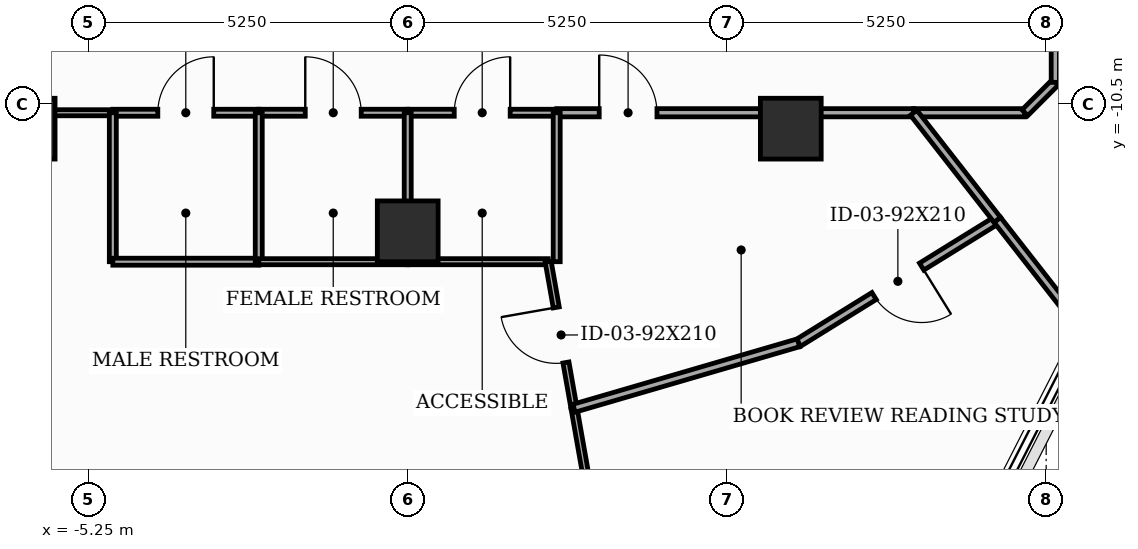
"""IFC4 building model, lengths in metres.
Left out: names, types, materials, properties, quantities, classifications, styles, units other than length and angle.
Written with IfcOpenShell. Run it as: python <this file> out.ifc"""

import sys

from ifc_helpers import new_model, si_unit, direction, frame, frame_2d, origin, origin_2d, place, context, subcontext, project, spatial, rectangle, extrude, element, fill, save


model = new_model("IFC4")
c1 = context("Model", 3, precision=1e-05, world=origin(), true_north=direction((0.0, 1.0)))
c2 = subcontext(c1, "Body", "Model", "MODEL_VIEW")
j1 = project(units=[si_unit("LENGTHUNIT", "METRE"), si_unit("PLANEANGLEUNIT", "RADIAN")], contexts=[c1])
p1 = place(None, origin())
s1 = spatial("IfcSite", under=j1, at=p1, CompositionType="ELEMENT")
p2 = place(p1, origin())
s2 = spatial("IfcBuilding", under=s1, at=p2, CompositionType="ELEMENT")
p3 = place(p2, frame((0.0, 0.0, 255.9)))
s3 = spatial("IfcBuildingStorey", under=s2, at=p3, CompositionType="ELEMENT", Elevation=255.9)
for number, where, z_axis, x_axis in (
    (1, (-6.3, -10.912, 0.0), (0.0, 0.0, 1.0), (1.0, 0.0, 0.0)),
    (2, (0.0, -12.6, 0.0), (0.0, 0.0, 1.0), (1.0, 0.0, 0.0)),
    (3, (6.3, -10.912, 0.0), (0.0, 0.0, 1.0), (1.0, 0.0, 0.0)),
):
    element("IfcColumn", number, at=place(p3, frame(where, z_axis=z_axis, x_axis=x_axis)), inside=s3, PredefinedType="COLUMN", context=c2, shape_type="SweptSolid", body=[
        extrude(rectangle(XDim=1.0, YDim=1.0, at=origin_2d()), origin(), (0.0, 0.0, 1.0), 3.7),
    ])
p4 = place(p3, frame((-4.85, -10.65, 0.0), z_axis=(0.0, 0.0, 1.0), x_axis=(1.0, 0.0, 0.0)))
e4 = element("IfcWall", 4, at=p4, inside=s3, PredefinedType="PARTITIONING", context=c2, shape_type="SweptSolid", body=[
    extrude(rectangle(XDim=2.4, YDim=0.115, at=frame_2d((1.2, 0.0))), origin(), (0.0, 0.0, 1.0), 3.5),
])
p5 = place(p4, frame((0.74, 0.0, 0.0)))
e5 = element("IfcOpeningElement", 5, at=p5, cuts=e4, PredefinedType="OPENING", context=c2, shape_type="SweptSolid", body=[
    extrude(rectangle(XDim=0.92, YDim=2.1, at=frame_2d((0.46, 1.05))), frame((0.0, 0.067, 0.0), z_axis=(0.0, -1.0, 0.0), x_axis=(1.0, 0.0, 0.0)), (0.0, 0.0, 1.0), 0.135),
])
p6 = place(p3, frame((-9.589, -10.65, 0.0), z_axis=(0.0, 0.0, 1.0), x_axis=(1.0, 0.0, 0.0)))
e6 = element("IfcWall", 6, at=p6, inside=s3, PredefinedType="MOVABLE", context=c2, shape_type="SweptSolid", body=[
    extrude(rectangle(XDim=4.739, YDim=0.1, at=frame_2d((2.37, 0.0))), origin(), (0.0, 0.0, 1.0), 2.885),
])
p7 = place(p3, frame((-2.45, -10.65, 0.0), z_axis=(0.0, 0.0, 1.0), x_axis=(1.0, 0.0, 0.0)))
e7 = element("IfcWall", 7, at=p7, inside=s3, PredefinedType="PARTITIONING", context=c2, shape_type="SweptSolid", body=[
    extrude(rectangle(XDim=2.45, YDim=0.115, at=frame_2d((1.225, 0.0))), origin(), (0.0, 0.0, 1.0), 2.885),
])
p8 = place(p7, frame((0.765, 0.0, 0.0)))
e8 = element("IfcOpeningElement", 8, at=p8, cuts=e7, PredefinedType="OPENING", context=c2, shape_type="SweptSolid", body=[
    extrude(rectangle(XDim=0.92, YDim=2.1, at=frame_2d((0.46, 1.05))), frame((0.0, 0.067, 0.0), z_axis=(0.0, -1.0, 0.0), x_axis=(1.0, 0.0, 0.0)), (0.0, 0.0, 1.0), 0.135),
])
p9 = place(p3, frame((0.0, -10.65, 0.0), z_axis=(0.0, 0.0, 1.0), x_axis=(1.0, 0.0, 0.0)))
e9 = element("IfcWall", 9, at=p9, inside=s3, PredefinedType="PARTITIONING", context=c2, shape_type="SweptSolid", body=[
    extrude(rectangle(XDim=2.45, YDim=0.115, at=frame_2d((1.225, 0.0))), origin(), (0.0, 0.0, 1.0), 3.5),
])
p10 = place(p9, frame((0.765, 0.0, 0.0)))
e10 = element("IfcOpeningElement", 10, at=p10, cuts=e9, PredefinedType="OPENING", context=c2, shape_type="SweptSolid", body=[
    extrude(rectangle(XDim=0.92, YDim=2.1, at=frame_2d((0.46, 1.05))), frame((0.0, 0.067, 0.0), z_axis=(0.0, -1.0, 0.0), x_axis=(1.0, 0.0, 0.0)), (0.0, 0.0, 1.0), 0.135),
])
p11 = place(p3, frame((2.45, -10.65, 0.0), z_axis=(0.0, 0.0, 1.0), x_axis=(1.0, 0.0, 0.0)))
e11 = element("IfcWall", 11, at=p11, inside=s3, PredefinedType="PARTITIONING", context=c2, shape_type="SweptSolid", body=[
    extrude(rectangle(XDim=5.871, YDim=0.135, at=frame_2d((2.936, 0.0))), origin(), (0.0, 0.0, 1.0), 2.885),
])
p12 = place(p11, frame((0.699, 0.0, 0.0)))
e12 = element("IfcOpeningElement", 12, at=p12, cuts=e11, PredefinedType="OPENING", context=c2, shape_type="SweptSolid", body=[
    extrude(rectangle(XDim=0.95, YDim=2.1, at=frame_2d((0.475, 1.05))), frame((0.0, 0.077, 0.0), z_axis=(0.0, -1.0, 0.0), x_axis=(1.0, 0.0, 0.0)), (0.0, 0.0, 1.0), 0.155),
])
p13 = place(p3, frame((8.321, -10.65, 0.0), z_axis=(0.0, 0.0, 1.0), x_axis=(1.0, 0.0, 0.0)))
e13 = element("IfcWall", 13, at=p13, inside=s3, PredefinedType="PARTITIONING", context=c2, shape_type="SweptSolid", body=[
    extrude(rectangle(XDim=1.829, YDim=0.135, at=frame_2d((0.915, 0.0))), origin(), (0.0, 0.0, 1.0), 3.5),
])
p14 = place(p3, frame((10.15, -10.65, 0.0), z_axis=(0.0, 0.0, 1.0), x_axis=(0.707106781187, 0.707106781187, 0.0)))
e14 = element("IfcWall", 14, at=p14, inside=s3, PredefinedType="PARTITIONING", context=c2, shape_type="SweptSolid", body=[
    extrude(rectangle(XDim=0.707, YDim=0.135, at=frame_2d((0.354, 0.0))), origin(), (0.0, 0.0, 1.0), 3.5),
])
p15 = place(p3, frame((10.65, -10.15, 0.0), z_axis=(0.0, 0.0, 1.0), x_axis=(0.0, 1.0, 0.0)))
e15 = element("IfcWall", 15, at=p15, inside=s3, PredefinedType="PARTITIONING", context=c2, shape_type="SweptSolid", body=[
    extrude(rectangle(XDim=5.408, YDim=0.135, at=frame_2d((2.704, 0.0))), origin(), (0.0, 0.0, 1.0), 2.885),
])
p16 = place(p3, frame((-4.85, -10.65, 0.0), z_axis=(0.0, 0.0, 1.0), x_axis=(0.0, -1.0, 0.0)))
e16 = element("IfcWall", 16, at=p16, inside=s3, PredefinedType="PARTITIONING", context=c2, shape_type="SweptSolid", body=[
    extrude(rectangle(XDim=2.45, YDim=0.115, at=frame_2d((1.225, 0.0))), origin(), (0.0, 0.0, 1.0), 2.885),
])
p17 = place(p3, frame((-4.85, -13.1, 0.0), z_axis=(0.0, 0.0, 1.0), x_axis=(1.0, 0.0, 0.0)))
e17 = element("IfcWall", 17, at=p17, inside=s3, PredefinedType="PARTITIONING", context=c2, shape_type="SweptSolid", body=[
    extrude(rectangle(XDim=2.4, YDim=0.115, at=frame_2d((1.2, 0.0))), origin(), (0.0, 0.0, 1.0), 3.5),
])
p18 = place(p3, frame((-2.45, -13.1, 0.0), z_axis=(0.0, 0.0, 1.0), x_axis=(0.0, 1.0, 0.0)))
e18 = element("IfcWall", 18, at=p18, inside=s3, PredefinedType="PARTITIONING", context=c2, shape_type="SweptSolid", body=[
    extrude(rectangle(XDim=2.45, YDim=0.115, at=frame_2d((1.225, 0.0))), origin(), (0.0, 0.0, 1.0), 2.885),
])
p19 = place(p3, frame((0.0, -13.1, 0.0), z_axis=(0.0, 0.0, 1.0), x_axis=(-1.0, 0.0, 0.0)))
e19 = element("IfcWall", 19, at=p19, inside=s3, PredefinedType="MOVABLE", context=c2, shape_type="SweptSolid", body=[
    extrude(rectangle(XDim=2.45, YDim=0.1, at=frame_2d((1.225, 0.0))), origin(), (0.0, 0.0, 1.0), 3.5),
])
p20 = place(p3, frame((2.31, -13.1, 0.0), z_axis=(0.0, 0.0, 1.0), x_axis=(-1.0, 0.0, 0.0)))
e20 = element("IfcWall", 20, at=p20, inside=s3, PredefinedType="MOVABLE", context=c2, shape_type="SweptSolid", body=[
    extrude(rectangle(XDim=2.31, YDim=0.1, at=frame_2d((1.155, 0.0))), origin(), (0.0, 0.0, 1.0), 3.5),
])
p21 = place(p3, frame((4.719, -26.759, 0.0), z_axis=(0.0, 0.0, 1.0), x_axis=(-0.173635361328, 0.984810012793, 0.0)))
e21 = element("IfcWall", 21, at=p21, inside=s3, PredefinedType="MOVABLE", context=c2, shape_type="SweptSolid", body=[
    extrude(rectangle(XDim=11.423, YDim=0.1, at=frame_2d((5.711, 0.0))), origin(), (0.0, 0.0, 1.0), 3.035),
])
p22 = place(p3, frame((2.735, -15.51, 0.0), z_axis=(0.0, 0.0, 1.0), x_axis=(-0.173694270709, 0.984799624453, 0.0)))
e22 = element("IfcWall", 22, at=p22, inside=s3, PredefinedType="MOVABLE", context=c2, shape_type="SweptSolid", body=[
    extrude(rectangle(XDim=2.447, YDim=0.1, at=frame_2d((1.224, 0.0))), origin(), (0.0, 0.0, 1.0), 3.185),
])
p23 = place(p22, frame((0.764, 0.0, 0.0)))
e23 = element("IfcOpeningElement", 23, at=p23, cuts=e22, PredefinedType="OPENING", context=c2, shape_type="SweptSolid", body=[
    extrude(rectangle(XDim=0.92, YDim=2.1, at=frame_2d((0.46, 1.05))), frame((0.0, 0.06, 0.0), z_axis=(0.0, -1.0, 0.0), x_axis=(1.0, 0.0, 0.0)), (0.0, 0.0, 1.0), 0.12),
])
for number, where, z_axis, x_axis in (
    (24, (0.0, -13.1, 0.0), (0.0, 0.0, 1.0), (0.0, 1.0, 0.0)),
    (25, (2.45, -13.1, 0.0), (0.0, 0.0, 1.0), (0.0, 1.0, 0.0)),
):
    element("IfcWall", number, at=place(p3, frame(where, z_axis=z_axis, x_axis=x_axis)), inside=s3, PredefinedType="PARTITIONING", context=c2, shape_type="SweptSolid", body=[
        extrude(rectangle(XDim=2.45, YDim=0.115, at=frame_2d((1.225, 0.0))), origin(), (0.0, 0.0, 1.0), 2.885),
    ])
p24 = place(p3, frame((9.696, -12.411, 0.0), z_axis=(0.0, 0.0, 1.0), x_axis=(-0.850393663863, -0.526146953295, 0.0)))
e26 = element("IfcWall", 26, at=p24, inside=s3, PredefinedType="PARTITIONING", context=c2, shape_type="SweptSolid", body=[
    extrude(rectangle(XDim=3.845, YDim=0.135, at=frame_2d((1.923, 0.0))), origin(), (0.0, 0.0, 1.0), 3.035),
])
p25 = place(p24, frame((1.463, 0.0, 0.0)))
e27 = element("IfcOpeningElement", 27, at=p25, cuts=e26, PredefinedType="OPENING", context=c2, shape_type="SweptSolid", body=[
    extrude(rectangle(XDim=0.92, YDim=2.1, at=frame_2d((0.46, 1.05))), frame((0.0, 0.077, 0.0), z_axis=(0.0, -1.0, 0.0), x_axis=(1.0, 0.0, 0.0)), (0.0, 0.0, 1.0), 0.155),
])
p26 = place(p3, frame((6.426, -14.434, 0.0), z_axis=(0.0, 0.0, 1.0), x_axis=(-0.960041241254, -0.279858562654, 0.0)))
e28 = element("IfcWall", 28, at=p26, inside=s3, PredefinedType="PARTITIONING", context=c2, shape_type="SweptSolid", body=[
    extrude(rectangle(XDim=3.844, YDim=0.135, at=frame_2d((1.922, 0.0))), origin(), (0.0, 0.0, 1.0), 3.185),
])
p27 = place(p3, frame((11.108, -14.218, 0.0), z_axis=(0.0, 0.0, 1.0), x_axis=(-0.615736984334, 0.787951753677, 0.0)))
e29 = element("IfcWall", 29, at=p27, inside=s3, PredefinedType="PARTITIONING", context=c2, shape_type="SweptSolid", body=[
    extrude(rectangle(XDim=2.294, YDim=0.135, at=frame_2d((1.147, 0.0))), origin(), (0.0, 0.0, 1.0), 3.035),
])
p28 = place(p3, frame((9.696, -12.411, 0.0), z_axis=(0.0, 0.0, 1.0), x_axis=(-0.615429845305, 0.788191668002, 0.0)))
e30 = element("IfcWall", 30, at=p28, inside=s3, PredefinedType="PARTITIONING", context=c2, shape_type="SweptSolid", body=[
    extrude(rectangle(XDim=2.234, YDim=0.135, at=frame_2d((1.117, 0.0))), origin(), (0.0, 0.0, 1.0), 3.5),
])
p29 = place(p5, origin())
e31 = element("IfcDoor", 31, at=p29, inside=s3, OperationType="SINGLE_SWING_RIGHT", PredefinedType="DOOR", context=c2, shape_type="SweptSolid", body=[
    extrude(rectangle(XDim=0.92, YDim=2.1, at=frame_2d((0.46, 1.05))), frame((0.0, 0.025, 0.0), z_axis=(0.0, -1.0, 0.0), x_axis=(1.0, 0.0, 0.0)), (0.0, 0.0, 1.0), 0.05),
])
fill(e5, e31)
p30 = place(p8, origin())
e32 = element("IfcDoor", 32, at=p30, inside=s3, OperationType="SINGLE_SWING_LEFT", PredefinedType="DOOR", context=c2, shape_type="SweptSolid", body=[
    extrude(rectangle(XDim=0.92, YDim=2.1, at=frame_2d((0.46, 1.05))), frame((0.0, 0.025, 0.0), z_axis=(0.0, -1.0, 0.0), x_axis=(1.0, 0.0, 0.0)), (0.0, 0.0, 1.0), 0.05),
])
fill(e8, e32)
p31 = place(p10, origin())
e33 = element("IfcDoor", 33, at=p31, inside=s3, OperationType="SINGLE_SWING_RIGHT", PredefinedType="DOOR", context=c2, shape_type="SweptSolid", body=[
    extrude(rectangle(XDim=0.92, YDim=2.1, at=frame_2d((0.46, 1.05))), frame((0.0, 0.025, 0.0), z_axis=(0.0, -1.0, 0.0), x_axis=(1.0, 0.0, 0.0)), (0.0, 0.0, 1.0), 0.05),
])
fill(e10, e33)
p32 = place(p12, origin())
e34 = element("IfcDoor", 34, at=p32, inside=s3, OperationType="SINGLE_SWING_LEFT", PredefinedType="DOOR", context=c2, shape_type="SweptSolid", body=[
    extrude(rectangle(XDim=0.95, YDim=2.1, at=frame_2d((0.475, 1.05))), frame((0.0, 0.025, 0.0), z_axis=(0.0, -1.0, 0.0), x_axis=(1.0, 0.0, 0.0)), (0.0, 0.0, 1.0), 0.05),
])
fill(e12, e34)
p33 = place(p23, origin())
e35 = element("IfcDoor", 35, at=p33, inside=s3, OperationType="SINGLE_SWING_RIGHT", PredefinedType="DOOR", context=c2, shape_type="SweptSolid", body=[
    extrude(rectangle(XDim=0.92, YDim=2.1, at=frame_2d((0.46, 1.05))), frame((0.0, 0.025, 0.0), z_axis=(0.0, -1.0, 0.0), x_axis=(1.0, 0.0, 0.0)), (0.0, 0.0, 1.0), 0.05),
])
fill(e23, e35)
p34 = place(p25, origin())
e36 = element("IfcDoor", 36, at=p34, inside=s3, OperationType="SINGLE_SWING_LEFT", PredefinedType="DOOR", context=c2, shape_type="SweptSolid", body=[
    extrude(rectangle(XDim=0.92, YDim=2.1, at=frame_2d((0.46, 1.05))), frame((0.0, 0.025, 0.0), z_axis=(0.0, -1.0, 0.0), x_axis=(1.0, 0.0, 0.0)), (0.0, 0.0, 1.0), 0.05),
])
fill(e27, e36)
save(model, sys.argv[1])
